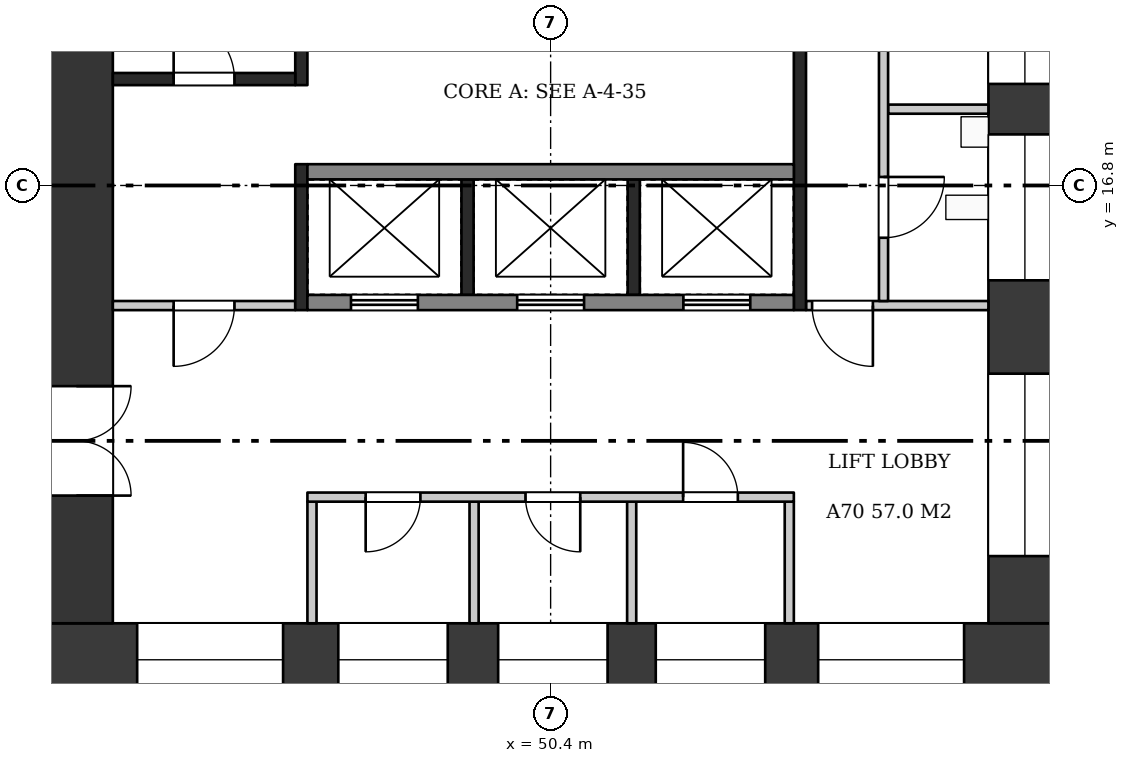
"""IFC4 building model, lengths in metres.
Left out: names, types, materials, properties, quantities, classifications, styles, units other than length and angle.
Written with IfcOpenShell. Run it as: python <this file> out.ifc"""

import sys

from ifc_helpers import new_model, si_unit, direction, frame, frame_2d, origin, place, context, subcontext, project, spatial, rectangle, extrude, element, fill, save


model = new_model("IFC4")
c1 = context("Model", 3, precision=1e-05, world=origin(), true_north=direction((0.0, 1.0)))
c2 = subcontext(c1, "Body", "Model", "MODEL_VIEW")
j1 = project(units=[si_unit("LENGTHUNIT", "METRE"), si_unit("PLANEANGLEUNIT", "RADIAN")], contexts=[c1])
p1 = place(None, origin())
s1 = spatial("IfcSite", under=j1, at=p1, CompositionType="ELEMENT")
p2 = place(p1, origin())
s2 = spatial("IfcBuilding", under=s1, at=p2, CompositionType="ELEMENT")
p3 = place(p2, frame((0.0, 0.0, 266.7)))
s3 = spatial("IfcBuildingStorey", under=s2, at=p3, CompositionType="ELEMENT", Elevation=266.7)
p4 = place(p3, frame((42.0, 9.0, 0.0), z_axis=(0.0, 0.0, 1.0), x_axis=(1.0, 0.0, 0.0)))
e1 = element("IfcWall", 1, at=p4, inside=s3, PredefinedType="SHEAR", context=c2, shape_type="SweptSolid", body=[
    extrude(rectangle(XDim=16.8, YDim=1.2, at=frame_2d((8.4, 0.0))), origin(), (0.0, 0.0, 1.0), 3.22),
])
p5 = place(p4, frame((1.6, 0.0, 0.6)))
e2 = element("IfcOpeningElement", 2, at=p5, cuts=e1, PredefinedType="OPENING", context=c2, shape_type="SweptSolid", body=[
    extrude(rectangle(XDim=2.4, YDim=2.1, at=frame_2d((1.2, 1.05))), frame((0.0, 0.61, 0.0), z_axis=(0.0, -1.0, 0.0), x_axis=(1.0, 0.0, 0.0)), (0.0, 0.0, 1.0), 1.22),
])
p6 = place(p4, frame((4.908, 0.0, 1.6)))
e3 = element("IfcOpeningElement", 3, at=p6, cuts=e1, PredefinedType="OPENING", context=c2, shape_type="SweptSolid", body=[
    extrude(rectangle(XDim=1.8, YDim=1.2, at=frame_2d((0.9, 0.6))), frame((0.0, 0.61, 0.0), z_axis=(0.0, -1.0, 0.0), x_axis=(1.0, 0.0, 0.0)), (0.0, 0.0, 1.0), 1.22),
])
p7 = place(p4, frame((7.537, 0.0, 1.6)))
e4 = element("IfcOpeningElement", 4, at=p7, cuts=e1, PredefinedType="OPENING", context=c2, shape_type="SweptSolid", body=[
    extrude(rectangle(XDim=1.8, YDim=1.2, at=frame_2d((0.9, 0.6))), frame((0.0, 0.61, 0.0), z_axis=(0.0, -1.0, 0.0), x_axis=(1.0, 0.0, 0.0)), (0.0, 0.0, 1.0), 1.22),
])
p8 = place(p4, frame((10.129, 0.0, 1.6)))
e5 = element("IfcOpeningElement", 5, at=p8, cuts=e1, PredefinedType="OPENING", context=c2, shape_type="SweptSolid", body=[
    extrude(rectangle(XDim=1.8, YDim=1.2, at=frame_2d((0.9, 0.6))), frame((0.0, 0.61, 0.0), z_axis=(0.0, -1.0, 0.0), x_axis=(1.0, 0.0, 0.0)), (0.0, 0.0, 1.0), 1.22),
])
p9 = place(p4, frame((12.8, 0.0, 0.6)))
e6 = element("IfcOpeningElement", 6, at=p9, cuts=e1, PredefinedType="OPENING", context=c2, shape_type="SweptSolid", body=[
    extrude(rectangle(XDim=2.4, YDim=2.1, at=frame_2d((1.2, 1.05))), frame((0.0, 0.61, 0.0), z_axis=(0.0, -1.0, 0.0), x_axis=(1.0, 0.0, 0.0)), (0.0, 0.0, 1.0), 1.22),
])
p10 = place(p3, frame((42.6, 9.6, 0.0), z_axis=(0.0, 0.0, 1.0), x_axis=(0.0, 1.0, 0.0)))
e7 = element("IfcWall", 7, at=p10, inside=s3, PredefinedType="SHEAR", context=c2, shape_type="SweptSolid", body=[
    extrude(rectangle(XDim=14.4, YDim=1.2, at=frame_2d((7.2, 0.0))), origin(), (0.0, 0.0, 1.0), 3.22),
])
p11 = place(p10, frame((2.1, 0.0, 0.0)))
e8 = element("IfcOpeningElement", 8, at=p11, cuts=e7, PredefinedType="OPENING", context=c2, shape_type="SweptSolid", body=[
    extrude(rectangle(XDim=1.8, YDim=2.1, at=frame_2d((0.9, 1.05))), frame((0.0, 0.61, 0.0), z_axis=(0.0, -1.0, 0.0), x_axis=(1.0, 0.0, 0.0)), (0.0, 0.0, 1.0), 1.22),
])
p12 = place(p3, frame((58.2, 9.6, 0.0), z_axis=(0.0, 0.0, 1.0), x_axis=(0.0, 1.0, 0.0)))
e9 = element("IfcWall", 9, at=p12, inside=s3, PredefinedType="SHEAR", context=c2, shape_type="SweptSolid", body=[
    extrude(rectangle(XDim=14.4, YDim=1.2, at=frame_2d((7.2, 0.0))), origin(), (0.0, 0.0, 1.0), 3.22),
])
p13 = place(p12, frame((1.105, 0.0, 0.6)))
e10 = element("IfcOpeningElement", 10, at=p13, cuts=e9, PredefinedType="OPENING", context=c2, shape_type="SweptSolid", body=[
    extrude(rectangle(XDim=3.0, YDim=2.1, at=frame_2d((1.5, 1.05))), frame((0.0, 0.61, 0.0), z_axis=(0.0, -1.0, 0.0), x_axis=(1.0, 0.0, 0.0)), (0.0, 0.0, 1.0), 1.22),
])
p14 = place(p12, frame((5.64, 0.0, 1.6)))
e11 = element("IfcOpeningElement", 11, at=p14, cuts=e9, PredefinedType="OPENING", context=c2, shape_type="SweptSolid", body=[
    extrude(rectangle(XDim=2.4, YDim=1.2, at=frame_2d((1.2, 0.6))), frame((0.0, 0.61, 0.0), z_axis=(0.0, -1.0, 0.0), x_axis=(1.0, 0.0, 0.0)), (0.0, 0.0, 1.0), 1.22),
])
p15 = place(p12, frame((8.87, 0.0, 1.6)))
e12 = element("IfcOpeningElement", 12, at=p15, cuts=e9, PredefinedType="OPENING", context=c2, shape_type="SweptSolid", body=[
    extrude(rectangle(XDim=2.4, YDim=1.2, at=frame_2d((1.2, 0.6))), frame((0.0, 0.61, 0.0), z_axis=(0.0, -1.0, 0.0), x_axis=(1.0, 0.0, 0.0)), (0.0, 0.0, 1.0), 1.22),
])
p16 = place(p12, frame((12.15, 0.0, 1.6)))
e13 = element("IfcOpeningElement", 13, at=p16, cuts=e9, PredefinedType="OPENING", context=c2, shape_type="SweptSolid", body=[
    extrude(rectangle(XDim=1.8, YDim=1.2, at=frame_2d((0.9, 0.6))), frame((0.0, 0.61, 0.0), z_axis=(0.0, -1.0, 0.0), x_axis=(1.0, 0.0, 0.0)), (0.0, 0.0, 1.0), 1.22),
])
for number, where, z_axis, x_axis in (
    (14, (46.475, 9.6, 0.0), (0.0, 0.0, 1.0), (0.0, 1.0, 0.0)),
    (15, (54.325, 9.6, 0.0), (0.0, 0.0, 1.0), (0.0, 1.0, 0.0)),
    (16, (49.141, 9.6, 0.0), (0.0, 0.0, 1.0), (0.0, 1.0, 0.0)),
    (17, (51.733, 9.6, 0.0), (0.0, 0.0, 1.0), (0.0, 1.0, 0.0)),
):
    element("IfcWall", number, at=place(p3, frame(where, z_axis=z_axis, x_axis=x_axis)), inside=s3, PredefinedType="PARTITIONING", context=c2, shape_type="SweptSolid", body=[
        extrude(rectangle(XDim=2.0, YDim=0.15, at=frame_2d((1.0, 0.0))), origin(), (0.0, 0.0, 1.0), 3.22),
    ])
p17 = place(p3, frame((46.4, 11.675, 0.0), z_axis=(0.0, 0.0, 1.0), x_axis=(1.0, 0.0, 0.0)))
e18 = element("IfcWall", 18, at=p17, inside=s3, PredefinedType="PARTITIONING", context=c2, shape_type="SweptSolid", body=[
    extrude(rectangle(XDim=8.0, YDim=0.15, at=frame_2d((4.0, 0.0))), origin(), (0.0, 0.0, 1.0), 3.22),
])
p18 = place(p17, frame((0.958, 0.0, 0.0)))
e19 = element("IfcOpeningElement", 19, at=p18, cuts=e18, PredefinedType="OPENING", context=c2, shape_type="SweptSolid", body=[
    extrude(rectangle(XDim=0.9, YDim=2.1, at=frame_2d((0.45, 1.05))), frame((0.0, 0.085, 0.0), z_axis=(0.0, -1.0, 0.0), x_axis=(1.0, 0.0, 0.0)), (0.0, 0.0, 1.0), 0.17),
])
p19 = place(p17, frame((3.587, 0.0, 0.0)))
e20 = element("IfcOpeningElement", 20, at=p19, cuts=e18, PredefinedType="OPENING", context=c2, shape_type="SweptSolid", body=[
    extrude(rectangle(XDim=0.9, YDim=2.1, at=frame_2d((0.45, 1.05))), frame((0.0, 0.085, 0.0), z_axis=(0.0, -1.0, 0.0), x_axis=(1.0, 0.0, 0.0)), (0.0, 0.0, 1.0), 0.17),
])
p20 = place(p17, frame((6.179, 0.0, 0.0)))
e21 = element("IfcOpeningElement", 21, at=p20, cuts=e18, PredefinedType="OPENING", context=c2, shape_type="SweptSolid", body=[
    extrude(rectangle(XDim=0.9, YDim=2.1, at=frame_2d((0.45, 1.05))), frame((0.0, 0.085, 0.0), z_axis=(0.0, -1.0, 0.0), x_axis=(1.0, 0.0, 0.0)), (0.0, 0.0, 1.0), 0.17),
])
for number, where, z_axis, x_axis in (
    (22, (49.033, 15.0, 0.0), (0.0, 0.0, 1.0), (0.0, 1.0, 0.0)),
    (23, (51.767, 15.0, 0.0), (0.0, 0.0, 1.0), (0.0, 1.0, 0.0)),
):
    element("IfcWall", number, at=place(p3, frame(where, z_axis=z_axis, x_axis=x_axis)), inside=s3, PredefinedType="SHEAR", context=c2, shape_type="SweptSolid", body=[
        extrude(rectangle(XDim=1.9, YDim=0.2, at=frame_2d((0.95, 0.0))), origin(), (0.0, 0.0, 1.0), 3.22),
    ])
p21 = place(p3, frame((46.4, 14.875, 0.0), z_axis=(0.0, 0.0, 1.0), x_axis=(1.0, 0.0, 0.0)))
e24 = element("IfcWall", 24, at=p21, inside=s3, PredefinedType="SHEAR", context=c2, shape_type="SweptSolid", body=[
    extrude(rectangle(XDim=8.0, YDim=0.25, at=frame_2d((4.0, 0.0))), origin(), (0.0, 0.0, 1.0), 3.22),
])
p22 = place(p21, frame((0.717, 0.0, 0.0)))
e25 = element("IfcOpeningElement", 25, at=p22, cuts=e24, PredefinedType="OPENING", context=c2, shape_type="SweptSolid", body=[
    extrude(rectangle(XDim=1.1, YDim=2.1, at=frame_2d((0.55, 1.05))), frame((0.0, 0.135, 0.0), z_axis=(0.0, -1.0, 0.0), x_axis=(1.0, 0.0, 0.0)), (0.0, 0.0, 1.0), 0.27),
])
p23 = place(p21, frame((3.45, 0.0, 0.0)))
e26 = element("IfcOpeningElement", 26, at=p23, cuts=e24, PredefinedType="OPENING", context=c2, shape_type="SweptSolid", body=[
    extrude(rectangle(XDim=1.1, YDim=2.1, at=frame_2d((0.55, 1.05))), frame((0.0, 0.135, 0.0), z_axis=(0.0, -1.0, 0.0), x_axis=(1.0, 0.0, 0.0)), (0.0, 0.0, 1.0), 0.27),
])
p24 = place(p21, frame((6.183, 0.0, 0.0)))
e27 = element("IfcOpeningElement", 27, at=p24, cuts=e24, PredefinedType="OPENING", context=c2, shape_type="SweptSolid", body=[
    extrude(rectangle(XDim=1.1, YDim=2.1, at=frame_2d((0.55, 1.05))), frame((0.0, 0.135, 0.0), z_axis=(0.0, -1.0, 0.0), x_axis=(1.0, 0.0, 0.0)), (0.0, 0.0, 1.0), 0.27),
])
p25 = place(p3, frame((46.4, 17.025, 0.0), z_axis=(0.0, 0.0, 1.0), x_axis=(1.0, 0.0, 0.0)))
e28 = element("IfcWall", 28, at=p25, inside=s3, PredefinedType="SHEAR", context=c2, shape_type="SweptSolid", body=[
    extrude(rectangle(XDim=8.0, YDim=0.25, at=frame_2d((4.0, 0.0))), origin(), (0.0, 0.0, 1.0), 3.22),
])
p26 = place(p3, frame((46.3, 14.75, 0.0), z_axis=(0.0, 0.0, 1.0), x_axis=(0.0, 1.0, 0.0)))
e29 = element("IfcWall", 29, at=p26, inside=s3, PredefinedType="SHEAR", context=c2, shape_type="SweptSolid", body=[
    extrude(rectangle(XDim=2.4, YDim=0.2, at=frame_2d((1.2, 0.0))), origin(), (0.0, 0.0, 1.0), 3.22),
])
p27 = place(p3, frame((46.3, 18.45, 0.0), z_axis=(0.0, 0.0, 1.0), x_axis=(0.0, 1.0, 0.0)))
e30 = element("IfcWall", 30, at=p27, inside=s3, PredefinedType="SHEAR", context=c2, shape_type="SweptSolid", body=[
    extrude(rectangle(XDim=5.55, YDim=0.2, at=frame_2d((2.775, 0.0))), origin(), (0.0, 0.0, 1.0), 3.22),
])
p28 = place(p3, frame((43.2, 14.825, 0.0), z_axis=(0.0, 0.0, 1.0), x_axis=(1.0, 0.0, 0.0)))
e31 = element("IfcWall", 31, at=p28, inside=s3, PredefinedType="PARTITIONING", context=c2, shape_type="SweptSolid", body=[
    extrude(rectangle(XDim=3.0, YDim=0.15, at=frame_2d((1.5, 0.0))), origin(), (0.0, 0.0, 1.0), 3.22),
])
p29 = place(p28, frame((1.0, 0.0, 0.0)))
e32 = element("IfcOpeningElement", 32, at=p29, cuts=e31, PredefinedType="OPENING", context=c2, shape_type="SweptSolid", body=[
    extrude(rectangle(XDim=1.0, YDim=2.1, at=frame_2d((0.5, 1.05))), frame((0.0, 0.085, 0.0), z_axis=(0.0, -1.0, 0.0), x_axis=(1.0, 0.0, 0.0)), (0.0, 0.0, 1.0), 0.17),
])
p30 = place(p3, frame((43.2, 18.55, 0.0), z_axis=(0.0, 0.0, 1.0), x_axis=(1.0, 0.0, 0.0)))
e33 = element("IfcWall", 33, at=p30, inside=s3, PredefinedType="SHEAR", context=c2, shape_type="SweptSolid", body=[
    extrude(rectangle(XDim=3.0, YDim=0.2, at=frame_2d((1.5, 0.0))), origin(), (0.0, 0.0, 1.0), 3.22),
])
p31 = place(p30, frame((1.0, 0.0, 0.0)))
e34 = element("IfcOpeningElement", 34, at=p31, cuts=e33, PredefinedType="OPENING", context=c2, shape_type="SweptSolid", body=[
    extrude(rectangle(XDim=1.0, YDim=2.1, at=frame_2d((0.5, 1.05))), frame((0.0, 0.11, 0.0), z_axis=(0.0, -1.0, 0.0), x_axis=(1.0, 0.0, 0.0)), (0.0, 0.0, 1.0), 0.22),
])
p32 = place(p3, frame((54.5, 14.75, 0.0), z_axis=(0.0, 0.0, 1.0), x_axis=(0.0, 1.0, 0.0)))
e35 = element("IfcWall", 35, at=p32, inside=s3, PredefinedType="SHEAR", context=c2, shape_type="SweptSolid", body=[
    extrude(rectangle(XDim=9.25, YDim=0.2, at=frame_2d((4.625, 0.0))), origin(), (0.0, 0.0, 1.0), 3.22),
])
p33 = place(p3, frame((54.6, 14.825, 0.0), z_axis=(0.0, 0.0, 1.0), x_axis=(1.0, 0.0, 0.0)))
e36 = element("IfcWall", 36, at=p33, inside=s3, PredefinedType="PARTITIONING", context=c2, shape_type="SweptSolid", body=[
    extrude(rectangle(XDim=3.0, YDim=0.15, at=frame_2d((1.5, 0.0))), origin(), (0.0, 0.0, 1.0), 3.22),
])
p34 = place(p33, frame((0.1, 0.0, 0.0)))
e37 = element("IfcOpeningElement", 37, at=p34, cuts=e36, PredefinedType="OPENING", context=c2, shape_type="SweptSolid", body=[
    extrude(rectangle(XDim=1.0, YDim=2.1, at=frame_2d((0.5, 1.05))), frame((0.0, 0.085, 0.0), z_axis=(0.0, -1.0, 0.0), x_axis=(1.0, 0.0, 0.0)), (0.0, 0.0, 1.0), 0.17),
])
p35 = place(p3, frame((55.95, 18.055, 0.0), z_axis=(0.0, 0.0, 1.0), x_axis=(1.0, 0.0, 0.0)))
e38 = element("IfcWall", 38, at=p35, inside=s3, PredefinedType="PARTITIONING", context=c2, shape_type="SweptSolid", body=[
    extrude(rectangle(XDim=1.65, YDim=0.15, at=frame_2d((0.825, 0.0))), origin(), (0.0, 0.0, 1.0), 3.22),
])
p36 = place(p3, frame((55.875, 14.9, 0.0), z_axis=(0.0, 0.0, 1.0), x_axis=(0.0, 1.0, 0.0)))
e39 = element("IfcWall", 39, at=p36, inside=s3, PredefinedType="PARTITIONING", context=c2, shape_type="SweptSolid", body=[
    extrude(rectangle(XDim=9.1, YDim=0.15, at=frame_2d((4.55, 0.0))), origin(), (0.0, 0.0, 1.0), 3.22),
])
p37 = place(p36, frame((1.04, 0.0, 0.0)))
e40 = element("IfcOpeningElement", 40, at=p37, cuts=e39, PredefinedType="OPENING", context=c2, shape_type="SweptSolid", body=[
    extrude(rectangle(XDim=1.0, YDim=2.1, at=frame_2d((0.5, 1.05))), frame((0.0, 0.085, 0.0), z_axis=(0.0, -1.0, 0.0), x_axis=(1.0, 0.0, 0.0)), (0.0, 0.0, 1.0), 0.17),
])
p38 = place(p36, frame((4.32, 0.0, 0.0)))
e41 = element("IfcOpeningElement", 41, at=p38, cuts=e39, PredefinedType="OPENING", context=c2, shape_type="SweptSolid", body=[
    extrude(rectangle(XDim=0.9, YDim=2.1, at=frame_2d((0.45, 1.05))), frame((0.0, 0.085, 0.0), z_axis=(0.0, -1.0, 0.0), x_axis=(1.0, 0.0, 0.0)), (0.0, 0.0, 1.0), 0.17),
])
p39 = place(p36, frame((7.28, 0.0, 0.0)))
e42 = element("IfcOpeningElement", 42, at=p39, cuts=e39, PredefinedType="OPENING", context=c2, shape_type="SweptSolid", body=[
    extrude(rectangle(XDim=1.0, YDim=2.1, at=frame_2d((0.5, 1.05))), frame((0.0, 0.085, 0.0), z_axis=(0.0, -1.0, 0.0), x_axis=(1.0, 0.0, 0.0)), (0.0, 0.0, 1.0), 0.17),
])
p40 = place(p11, frame((1.8, 0.0, 0.0), z_axis=(0.0, 0.0, 1.0), x_axis=(-1.0, 0.0, 0.0)))
e43 = element("IfcDoor", 43, at=p40, inside=s3, OperationType="DOUBLE_DOOR_SINGLE_SWING", PredefinedType="DOOR", context=c2, shape_type="SweptSolid", body=[
    extrude(rectangle(XDim=1.8, YDim=2.1, at=frame_2d((0.9, 1.05))), frame((0.0, 0.025, 0.0), z_axis=(0.0, -1.0, 0.0), x_axis=(1.0, 0.0, 0.0)), (0.0, 0.0, 1.0), 0.05),
])
fill(e8, e43)
p41 = place(p18, frame((0.9, 0.0, 0.0), z_axis=(0.0, 0.0, 1.0), x_axis=(-1.0, 0.0, 0.0)))
e44 = element("IfcDoor", 44, at=p41, inside=s3, OperationType="SINGLE_SWING_RIGHT", PredefinedType="DOOR", context=c2, shape_type="SweptSolid", body=[
    extrude(rectangle(XDim=0.9, YDim=2.1, at=frame_2d((0.45, 1.05))), frame((0.0, 0.025, 0.0), z_axis=(0.0, -1.0, 0.0), x_axis=(1.0, 0.0, 0.0)), (0.0, 0.0, 1.0), 0.05),
])
fill(e19, e44)
p42 = place(p19, frame((0.9, 0.0, 0.0), z_axis=(0.0, 0.0, 1.0), x_axis=(-1.0, 0.0, 0.0)))
e45 = element("IfcDoor", 45, at=p42, inside=s3, OperationType="SINGLE_SWING_LEFT", PredefinedType="DOOR", context=c2, shape_type="SweptSolid", body=[
    extrude(rectangle(XDim=0.9, YDim=2.1, at=frame_2d((0.45, 1.05))), frame((0.0, 0.025, 0.0), z_axis=(0.0, -1.0, 0.0), x_axis=(1.0, 0.0, 0.0)), (0.0, 0.0, 1.0), 0.05),
])
fill(e20, e45)
p43 = place(p20, origin())
e46 = element("IfcDoor", 46, at=p43, inside=s3, OperationType="SINGLE_SWING_LEFT", PredefinedType="DOOR", context=c2, shape_type="SweptSolid", body=[
    extrude(rectangle(XDim=0.9, YDim=2.1, at=frame_2d((0.45, 1.05))), frame((0.0, 0.025, 0.0), z_axis=(0.0, -1.0, 0.0), x_axis=(1.0, 0.0, 0.0)), (0.0, 0.0, 1.0), 0.05),
])
fill(e21, e46)
p44 = place(p22, origin())
e47 = element("IfcDoor", 47, at=p44, inside=s3, OperationType="DOUBLE_DOOR_SLIDING", PredefinedType="DOOR", context=c2, shape_type="SweptSolid", body=[
    extrude(rectangle(XDim=1.1, YDim=2.1, at=frame_2d((0.55, 1.05))), frame((0.0, 0.025, 0.0), z_axis=(0.0, -1.0, 0.0), x_axis=(1.0, 0.0, 0.0)), (0.0, 0.0, 1.0), 0.05),
])
fill(e25, e47)
p45 = place(p23, origin())
e48 = element("IfcDoor", 48, at=p45, inside=s3, OperationType="DOUBLE_DOOR_SLIDING", PredefinedType="DOOR", context=c2, shape_type="SweptSolid", body=[
    extrude(rectangle(XDim=1.1, YDim=2.1, at=frame_2d((0.55, 1.05))), frame((0.0, 0.025, 0.0), z_axis=(0.0, -1.0, 0.0), x_axis=(1.0, 0.0, 0.0)), (0.0, 0.0, 1.0), 0.05),
])
fill(e26, e48)
p46 = place(p24, origin())
e49 = element("IfcDoor", 49, at=p46, inside=s3, OperationType="DOUBLE_DOOR_SLIDING", PredefinedType="DOOR", context=c2, shape_type="SweptSolid", body=[
    extrude(rectangle(XDim=1.1, YDim=2.1, at=frame_2d((0.55, 1.05))), frame((0.0, 0.025, 0.0), z_axis=(0.0, -1.0, 0.0), x_axis=(1.0, 0.0, 0.0)), (0.0, 0.0, 1.0), 0.05),
])
fill(e27, e49)
p47 = place(p29, frame((1.0, 0.0, 0.0), z_axis=(0.0, 0.0, 1.0), x_axis=(-1.0, 0.0, 0.0)))
e50 = element("IfcDoor", 50, at=p47, inside=s3, OperationType="SINGLE_SWING_RIGHT", PredefinedType="DOOR", context=c2, shape_type="SweptSolid", body=[
    extrude(rectangle(XDim=1.0, YDim=2.1, at=frame_2d((0.5, 1.05))), frame((0.0, 0.025, 0.0), z_axis=(0.0, -1.0, 0.0), x_axis=(1.0, 0.0, 0.0)), (0.0, 0.0, 1.0), 0.05),
])
fill(e32, e50)
p48 = place(p31, origin())
e51 = element("IfcDoor", 51, at=p48, inside=s3, OperationType="SINGLE_SWING_LEFT", PredefinedType="DOOR", context=c2, shape_type="SweptSolid", body=[
    extrude(rectangle(XDim=1.0, YDim=2.1, at=frame_2d((0.5, 1.05))), frame((0.0, 0.025, 0.0), z_axis=(0.0, -1.0, 0.0), x_axis=(1.0, 0.0, 0.0)), (0.0, 0.0, 1.0), 0.05),
])
fill(e34, e51)
p49 = place(p34, frame((1.0, 0.0, 0.0), z_axis=(0.0, 0.0, 1.0), x_axis=(-1.0, 0.0, 0.0)))
e52 = element("IfcDoor", 52, at=p49, inside=s3, OperationType="SINGLE_SWING_LEFT", PredefinedType="DOOR", context=c2, shape_type="SweptSolid", body=[
    extrude(rectangle(XDim=1.0, YDim=2.1, at=frame_2d((0.5, 1.05))), frame((0.0, 0.025, 0.0), z_axis=(0.0, -1.0, 0.0), x_axis=(1.0, 0.0, 0.0)), (0.0, 0.0, 1.0), 0.05),
])
fill(e37, e52)
p50 = place(p37, frame((1.0, 0.0, 0.0), z_axis=(0.0, 0.0, 1.0), x_axis=(-1.0, 0.0, 0.0)))
e53 = element("IfcDoor", 53, at=p50, inside=s3, OperationType="SINGLE_SWING_LEFT", PredefinedType="DOOR", context=c2, shape_type="SweptSolid", body=[
    extrude(rectangle(XDim=1.0, YDim=2.1, at=frame_2d((0.5, 1.05))), frame((0.0, 0.025, 0.0), z_axis=(0.0, -1.0, 0.0), x_axis=(1.0, 0.0, 0.0)), (0.0, 0.0, 1.0), 0.05),
])
fill(e40, e53)
p51 = place(p5, origin())
e54 = element("IfcWindow", 54, at=p51, inside=s3, PartitioningType="SINGLE_PANEL", PredefinedType="WINDOW", context=c2, shape_type="SweptSolid", body=[
    extrude(rectangle(XDim=2.4, YDim=2.1, at=frame_2d((1.2, 1.05))), frame((0.0, 0.03, 0.0), z_axis=(0.0, -1.0, 0.0), x_axis=(1.0, 0.0, 0.0)), (0.0, 0.0, 1.0), 0.06),
])
fill(e2, e54)
p52 = place(p6, origin())
e55 = element("IfcWindow", 55, at=p52, inside=s3, PartitioningType="SINGLE_PANEL", PredefinedType="WINDOW", context=c2, shape_type="SweptSolid", body=[
    extrude(rectangle(XDim=1.8, YDim=1.2, at=frame_2d((0.9, 0.6))), frame((0.0, 0.03, 0.0), z_axis=(0.0, -1.0, 0.0), x_axis=(1.0, 0.0, 0.0)), (0.0, 0.0, 1.0), 0.06),
])
fill(e3, e55)
p53 = place(p7, origin())
e56 = element("IfcWindow", 56, at=p53, inside=s3, PartitioningType="SINGLE_PANEL", PredefinedType="WINDOW", context=c2, shape_type="SweptSolid", body=[
    extrude(rectangle(XDim=1.8, YDim=1.2, at=frame_2d((0.9, 0.6))), frame((0.0, 0.03, 0.0), z_axis=(0.0, -1.0, 0.0), x_axis=(1.0, 0.0, 0.0)), (0.0, 0.0, 1.0), 0.06),
])
fill(e4, e56)
p54 = place(p8, origin())
e57 = element("IfcWindow", 57, at=p54, inside=s3, PartitioningType="SINGLE_PANEL", PredefinedType="WINDOW", context=c2, shape_type="SweptSolid", body=[
    extrude(rectangle(XDim=1.8, YDim=1.2, at=frame_2d((0.9, 0.6))), frame((0.0, 0.03, 0.0), z_axis=(0.0, -1.0, 0.0), x_axis=(1.0, 0.0, 0.0)), (0.0, 0.0, 1.0), 0.06),
])
fill(e5, e57)
p55 = place(p9, origin())
e58 = element("IfcWindow", 58, at=p55, inside=s3, PartitioningType="SINGLE_PANEL", PredefinedType="WINDOW", context=c2, shape_type="SweptSolid", body=[
    extrude(rectangle(XDim=2.4, YDim=2.1, at=frame_2d((1.2, 1.05))), frame((0.0, 0.03, 0.0), z_axis=(0.0, -1.0, 0.0), x_axis=(1.0, 0.0, 0.0)), (0.0, 0.0, 1.0), 0.06),
])
fill(e6, e58)
p56 = place(p13, origin())
e59 = element("IfcWindow", 59, at=p56, inside=s3, PartitioningType="SINGLE_PANEL", PredefinedType="WINDOW", context=c2, shape_type="SweptSolid", body=[
    extrude(rectangle(XDim=3.0, YDim=2.1, at=frame_2d((1.5, 1.05))), frame((0.0, 0.03, 0.0), z_axis=(0.0, -1.0, 0.0), x_axis=(1.0, 0.0, 0.0)), (0.0, 0.0, 1.0), 0.06),
])
fill(e10, e59)
p57 = place(p14, origin())
e60 = element("IfcWindow", 60, at=p57, inside=s3, PartitioningType="SINGLE_PANEL", PredefinedType="WINDOW", context=c2, shape_type="SweptSolid", body=[
    extrude(rectangle(XDim=2.4, YDim=1.2, at=frame_2d((1.2, 0.6))), frame((0.0, 0.03, 0.0), z_axis=(0.0, -1.0, 0.0), x_axis=(1.0, 0.0, 0.0)), (0.0, 0.0, 1.0), 0.06),
])
fill(e11, e60)
p58 = place(p15, origin())
e61 = element("IfcWindow", 61, at=p58, inside=s3, PartitioningType="SINGLE_PANEL", PredefinedType="WINDOW", context=c2, shape_type="SweptSolid", body=[
    extrude(rectangle(XDim=2.4, YDim=1.2, at=frame_2d((1.2, 0.6))), frame((0.0, 0.03, 0.0), z_axis=(0.0, -1.0, 0.0), x_axis=(1.0, 0.0, 0.0)), (0.0, 0.0, 1.0), 0.06),
])
fill(e12, e61)
save(model, sys.argv[1])
